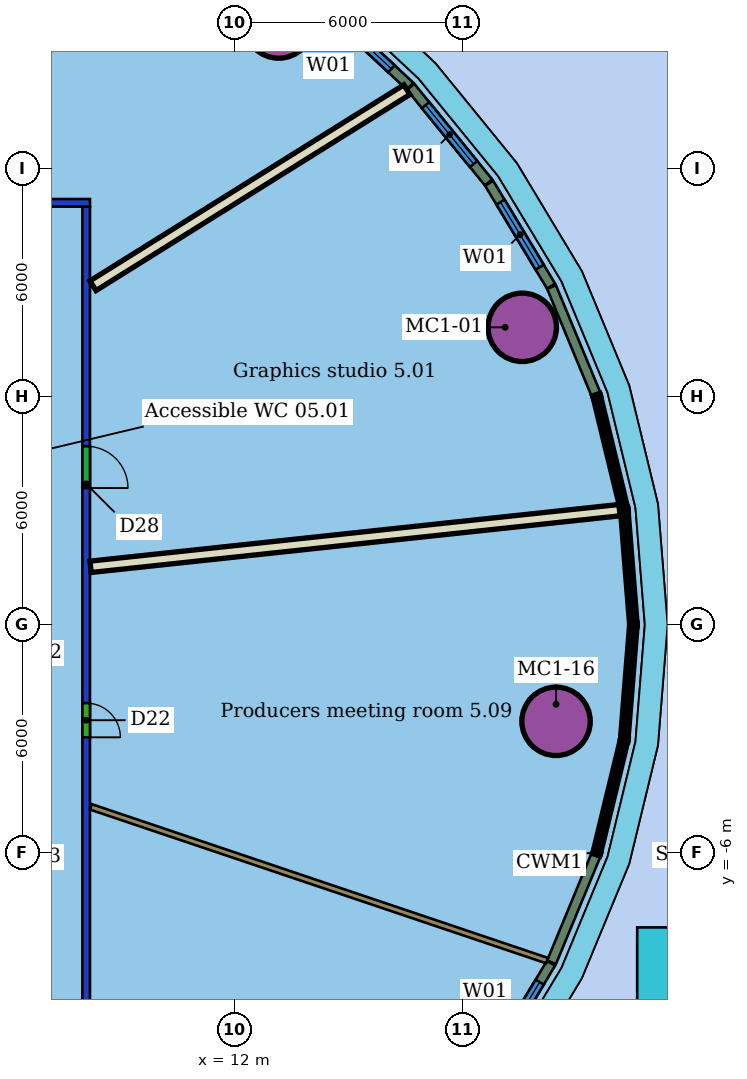
"""IFC4 building model, lengths in metres.
Left out: names, types, materials, properties, quantities, classifications, styles, units other than length and angle.
Written with IfcOpenShell. Run it as: python <this file> out.ifc"""

import sys

from ifc_helpers import new_model, si_unit, direction, frame, frame_2d, origin, origin_2d, place, context, subcontext, project, spatial, rectangle, hollow_circle, extrude, element, fill, save


model = new_model("IFC4")
c1 = context("Model", 3, precision=1e-05, world=origin(), true_north=direction((0.0, 1.0)))
c2 = subcontext(c1, "Body", "Model", "MODEL_VIEW")
j1 = project(units=[si_unit("LENGTHUNIT", "METRE"), si_unit("PLANEANGLEUNIT", "RADIAN")], contexts=[c1])
p1 = place(None, origin())
s1 = spatial("IfcSite", under=j1, at=p1, CompositionType="ELEMENT")
p2 = place(p1, origin())
s2 = spatial("IfcBuilding", under=s1, at=p2, CompositionType="ELEMENT")
p3 = place(p2, frame((0.0, 0.0, 36.0)))
s3 = spatial("IfcBuildingStorey", under=s2, at=p3, CompositionType="ELEMENT", Elevation=36.0)
for number, where, z_axis, x_axis in (
    (1, (19.575, 7.824, 0.0), (0.0, 0.0, 1.0), (1.0, 0.0, 0.0)),
    (2, (13.166, 15.805, 0.0), (0.0, 0.0, 1.0), (1.0, 0.0, 0.0)),
    (3, (20.464, -2.543, 0.0), (0.0, 0.0, 1.0), (1.0, 0.0, 0.0)),
):
    element("IfcColumn", number, at=place(p3, frame(where, z_axis=z_axis, x_axis=x_axis)), inside=s3, PredefinedType="COLUMN", context=c2, shape_type="SweptSolid", body=[
        extrude(hollow_circle(Radius=0.9, WallThickness=0.06, at=origin_2d()), origin(), (0.0, 0.0, 1.0), 3.55),
    ])
p4 = place(p3, frame((-20.2, 11.1, 0.0), z_axis=(0.0, 0.0, 1.0), x_axis=(1.0, 0.0, 0.0)))
e4 = element("IfcWall", 4, at=p4, inside=s3, PredefinedType="PARTITIONING", context=c2, shape_type="SweptSolid", body=[
    extrude(rectangle(XDim=28.4, YDim=0.2, at=frame_2d((14.2, 0.0))), origin(), (0.0, 0.0, 1.0), 2.85),
])
p5 = place(p4, frame((16.853, 0.0, 0.0)))
e5 = element("IfcOpeningElement", 5, at=p5, cuts=e4, PredefinedType="OPENING", context=c2, shape_type="SweptSolid", body=[
    extrude(rectangle(XDim=1.8, YDim=2.1, at=frame_2d((0.9, 1.05))), frame((0.0, 0.11, 0.0), z_axis=(0.0, -1.0, 0.0), x_axis=(1.0, 0.0, 0.0)), (0.0, 0.0, 1.0), 0.22),
])
p6 = place(p4, frame((9.53, 0.0, 0.0)))
e6 = element("IfcOpeningElement", 6, at=p6, cuts=e4, PredefinedType="OPENING", context=c2, shape_type="SweptSolid", body=[
    extrude(rectangle(XDim=1.0, YDim=2.1, at=frame_2d((0.5, 1.05))), frame((0.0, 0.11, 0.0), z_axis=(0.0, -1.0, 0.0), x_axis=(1.0, 0.0, 0.0)), (0.0, 0.0, 1.0), 0.22),
])
p7 = place(p4, frame((4.492, 0.0, 0.0)))
e7 = element("IfcOpeningElement", 7, at=p7, cuts=e4, PredefinedType="OPENING", context=c2, shape_type="SweptSolid", body=[
    extrude(rectangle(XDim=1.8, YDim=2.1, at=frame_2d((0.9, 1.05))), frame((0.0, 0.11, 0.0), z_axis=(0.0, -1.0, 0.0), x_axis=(1.0, 0.0, 0.0)), (0.0, 0.0, 1.0), 0.22),
])
p8 = place(p3, frame((8.1, 11.0, 0.0), z_axis=(0.0, 0.0, 1.0), x_axis=(0.0, -1.0, 0.0)))
e8 = element("IfcWall", 8, at=p8, inside=s3, PredefinedType="PARTITIONING", context=c2, shape_type="SweptSolid", body=[
    extrude(rectangle(XDim=22.0, YDim=0.2, at=frame_2d((11.0, 0.0))), origin(), (0.0, 0.0, 1.0), 2.85),
])
p9 = place(p8, frame((6.305, 0.0, 0.0)))
e9 = element("IfcOpeningElement", 9, at=p9, cuts=e8, PredefinedType="OPENING", context=c2, shape_type="SweptSolid", body=[
    extrude(rectangle(XDim=1.1, YDim=2.1, at=frame_2d((0.55, 1.05))), frame((0.0, 0.11, 0.0), z_axis=(0.0, -1.0, 0.0), x_axis=(1.0, 0.0, 0.0)), (0.0, 0.0, 1.0), 0.22),
])
p10 = place(p8, frame((13.064, 0.0, 0.0)))
e10 = element("IfcOpeningElement", 10, at=p10, cuts=e8, PredefinedType="OPENING", context=c2, shape_type="SweptSolid", body=[
    extrude(rectangle(XDim=0.9, YDim=2.1, at=frame_2d((0.45, 1.05))), frame((0.0, 0.11, 0.0), z_axis=(0.0, -1.0, 0.0), x_axis=(1.0, 0.0, 0.0)), (0.0, 0.0, 1.0), 0.22),
])
p11 = place(p3, frame((22.134, 3.013, 0.0), z_axis=(0.0, 0.0, 1.0), x_axis=(-0.994314695198, -0.106481392334, 0.0)))
e11 = element("IfcWall", 11, at=p11, inside=s3, PredefinedType="PARTITIONING", context=c2, shape_type="SweptSolid", body=[
    extrude(rectangle(XDim=13.998, YDim=0.3, at=frame_2d((6.999, 0.0))), origin(), (0.0, 0.0, 1.0), 3.55),
])
p12 = place(p3, frame((16.538, 14.076, 0.0), z_axis=(0.0, 0.0, 1.0), x_axis=(-0.848172924514, -0.529719444726, 0.0)))
e12 = element("IfcWall", 12, at=p12, inside=s3, PredefinedType="PARTITIONING", context=c2, shape_type="SweptSolid", body=[
    extrude(rectangle(XDim=9.737, YDim=0.3, at=frame_2d((4.869, 0.0))), origin(), (0.0, 0.0, 1.0), 3.55),
])
p13 = place(p3, frame((20.229, -8.84, 0.0), z_axis=(0.0, 0.0, 1.0), x_axis=(-0.947627736463, 0.319377007762, 0.0)))
e13 = element("IfcWall", 13, at=p13, inside=s3, PredefinedType="PARTITIONING", context=c2, shape_type="SweptSolid", body=[
    extrude(rectangle(XDim=12.668, YDim=0.15, at=frame_2d((6.334, 0.0))), origin(), (0.0, 0.0, 1.0), 3.55),
])
p14 = place(p3, frame((21.512, 6.066, 0.0), z_axis=(0.0, 0.0, 1.0), x_axis=(-0.382665181283, 0.923887092146, 0.0)))
e14 = element("IfcWall", 14, at=p14, inside=s3, PredefinedType="SOLIDWALL", context=c2, shape_type="SweptSolid", body=[
    extrude(rectangle(XDim=3.05, YDim=0.25, at=frame_2d((1.525, 0.0))), origin(), (0.0, 0.0, 1.0), 3.15),
])
p15 = place(p3, frame((20.333, 8.907, 0.0), z_axis=(0.0, 0.0, 1.0), x_axis=(-0.51563096518, 0.856810777096, 0.0)))
e15 = element("IfcWall", 15, at=p15, inside=s3, PredefinedType="SOLIDWALL", context=c2, shape_type="SweptSolid", body=[
    extrude(rectangle(XDim=3.161, YDim=0.25, at=frame_2d((1.581, 0.0))), origin(), (0.0, 0.0, 1.0), 3.15),
])
p16 = place(p15, frame((0.581, 0.0, 0.8)))
e16 = element("IfcOpeningElement", 16, at=p16, cuts=e15, PredefinedType="OPENING", context=c2, shape_type="SweptSolid", body=[
    extrude(rectangle(XDim=2.0, YDim=2.2, at=frame_2d((1.0, 1.1))), frame((0.0, 0.135, 0.0), z_axis=(0.0, -1.0, 0.0), x_axis=(1.0, 0.0, 0.0)), (0.0, 0.0, 1.0), 0.27),
])
p17 = place(p3, frame((18.688, 11.637, 0.0), z_axis=(0.0, 0.0, 1.0), x_axis=(-0.631970989947, 0.774992043743, 0.0)))
e17 = element("IfcWall", 17, at=p17, inside=s3, PredefinedType="SOLIDWALL", context=c2, shape_type="SweptSolid", body=[
    extrude(rectangle(XDim=3.245, YDim=0.25, at=frame_2d((1.623, 0.0))), origin(), (0.0, 0.0, 1.0), 3.15),
])
p18 = place(p17, frame((0.623, 0.0, 0.8)))
e18 = element("IfcOpeningElement", 18, at=p18, cuts=e17, PredefinedType="OPENING", context=c2, shape_type="SweptSolid", body=[
    extrude(rectangle(XDim=2.0, YDim=2.2, at=frame_2d((1.0, 1.1))), frame((0.0, 0.135, 0.0), z_axis=(0.0, -1.0, 0.0), x_axis=(1.0, 0.0, 0.0)), (0.0, 0.0, 1.0), 0.27),
])
p19 = place(p3, frame((16.621, 14.17, 0.0), z_axis=(0.0, 0.0, 1.0), x_axis=(-0.730670592597, 0.682730170063, 0.0)))
e19 = element("IfcWall", 19, at=p19, inside=s3, PredefinedType="SOLIDWALL", context=c2, shape_type="SweptSolid", body=[
    extrude(rectangle(XDim=3.336, YDim=0.25, at=frame_2d((1.668, 0.0))), origin(), (0.0, 0.0, 1.0), 3.15),
])
p20 = place(p19, frame((0.668, 0.0, 0.8)))
e20 = element("IfcOpeningElement", 20, at=p20, cuts=e19, PredefinedType="OPENING", context=c2, shape_type="SweptSolid", body=[
    extrude(rectangle(XDim=2.0, YDim=2.2, at=frame_2d((1.0, 1.1))), frame((0.0, 0.135, 0.0), z_axis=(0.0, -1.0, 0.0), x_axis=(1.0, 0.0, 0.0)), (0.0, 0.0, 1.0), 0.27),
])
p21 = place(p3, frame((18.703, -11.616, 0.0), z_axis=(0.0, 0.0, 1.0), x_axis=(0.51563096518, 0.856810777096, 0.0)))
e21 = element("IfcWall", 21, at=p21, inside=s3, PredefinedType="SOLIDWALL", context=c2, shape_type="SweptSolid", body=[
    extrude(rectangle(XDim=3.161, YDim=0.25, at=frame_2d((1.581, 0.0))), origin(), (0.0, 0.0, 1.0), 3.15),
])
p22 = place(p21, frame((0.581, 0.0, 0.8)))
e22 = element("IfcOpeningElement", 22, at=p22, cuts=e21, PredefinedType="OPENING", context=c2, shape_type="SweptSolid", body=[
    extrude(rectangle(XDim=2.0, YDim=2.2, at=frame_2d((1.0, 1.1))), frame((0.0, 0.135, 0.0), z_axis=(0.0, -1.0, 0.0), x_axis=(1.0, 0.0, 0.0)), (0.0, 0.0, 1.0), 0.27),
])
p23 = place(p3, frame((20.345, -8.884, 0.0), z_axis=(0.0, 0.0, 1.0), x_axis=(0.382665181283, 0.923887092146, 0.0)))
e23 = element("IfcWall", 23, at=p23, inside=s3, PredefinedType="SOLIDWALL", context=c2, shape_type="SweptSolid", body=[
    extrude(rectangle(XDim=3.05, YDim=0.25, at=frame_2d((1.525, 0.0))), origin(), (0.0, 0.0, 1.0), 3.15),
])
p24 = place(p9, origin())
e24 = element("IfcDoor", 24, at=p24, inside=s3, OperationType="SINGLE_SWING_RIGHT", PredefinedType="DOOR", context=c2, shape_type="SweptSolid", body=[
    extrude(rectangle(XDim=1.1, YDim=2.1, at=frame_2d((0.55, 1.05))), frame((0.0, 0.025, 0.0), z_axis=(0.0, -1.0, 0.0), x_axis=(1.0, 0.0, 0.0)), (0.0, 0.0, 1.0), 0.05),
])
fill(e9, e24)
p25 = place(p10, origin())
e25 = element("IfcDoor", 25, at=p25, inside=s3, OperationType="SINGLE_SWING_RIGHT", PredefinedType="DOOR", context=c2, shape_type="SweptSolid", body=[
    extrude(rectangle(XDim=0.9, YDim=2.1, at=frame_2d((0.45, 1.05))), frame((0.0, 0.025, 0.0), z_axis=(0.0, -1.0, 0.0), x_axis=(1.0, 0.0, 0.0)), (0.0, 0.0, 1.0), 0.05),
])
fill(e10, e25)
p26 = place(p16, origin())
e26 = element("IfcWindow", 26, at=p26, inside=s3, PartitioningType="SINGLE_PANEL", PredefinedType="WINDOW", context=c2, shape_type="SweptSolid", body=[
    extrude(rectangle(XDim=2.0, YDim=2.2, at=frame_2d((1.0, 1.1))), frame((0.0, 0.03, 0.0), z_axis=(0.0, -1.0, 0.0), x_axis=(1.0, 0.0, 0.0)), (0.0, 0.0, 1.0), 0.06),
])
fill(e16, e26)
p27 = place(p18, origin())
e27 = element("IfcWindow", 27, at=p27, inside=s3, PartitioningType="SINGLE_PANEL", PredefinedType="WINDOW", context=c2, shape_type="SweptSolid", body=[
    extrude(rectangle(XDim=2.0, YDim=2.2, at=frame_2d((1.0, 1.1))), frame((0.0, 0.03, 0.0), z_axis=(0.0, -1.0, 0.0), x_axis=(1.0, 0.0, 0.0)), (0.0, 0.0, 1.0), 0.06),
])
fill(e18, e27)
p28 = place(p20, origin())
e28 = element("IfcWindow", 28, at=p28, inside=s3, PartitioningType="SINGLE_PANEL", PredefinedType="WINDOW", context=c2, shape_type="SweptSolid", body=[
    extrude(rectangle(XDim=2.0, YDim=2.2, at=frame_2d((1.0, 1.1))), frame((0.0, 0.03, 0.0), z_axis=(0.0, -1.0, 0.0), x_axis=(1.0, 0.0, 0.0)), (0.0, 0.0, 1.0), 0.06),
])
fill(e20, e28)
p29 = place(p22, origin())
e29 = element("IfcWindow", 29, at=p29, inside=s3, PartitioningType="SINGLE_PANEL", PredefinedType="WINDOW", context=c2, shape_type="SweptSolid", body=[
    extrude(rectangle(XDim=2.0, YDim=2.2, at=frame_2d((1.0, 1.1))), frame((0.0, 0.03, 0.0), z_axis=(0.0, -1.0, 0.0), x_axis=(1.0, 0.0, 0.0)), (0.0, 0.0, 1.0), 0.06),
])
fill(e22, e29)
p30 = place(p3, frame((0.0, 0.0, -0.15)))
p31 = place(p30, frame((26.4, -11.765, 0.0)))
p32 = place(p31, frame((0.0, 0.0, 0.1)))
e30 = element("IfcWindow", 30, at=p32, inside=s3, PartitioningType="SINGLE_PANEL", PredefinedType="SKYLIGHT", context=c2, shape_type="SweptSolid", body=[
    extrude(rectangle(XDim=7.6, YDim=7.6, at=origin_2d()), origin(), (0.0, 0.0, 1.0), 0.05),
])
save(model, sys.argv[1])
